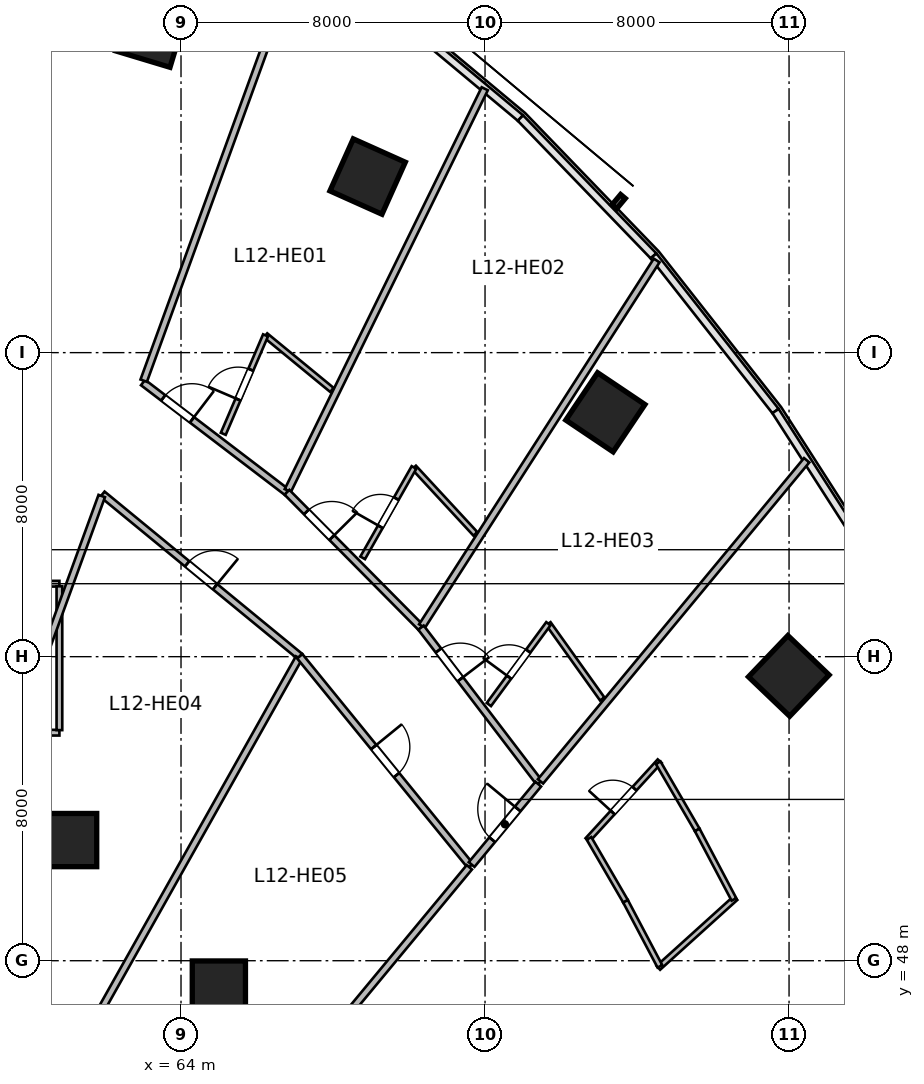
"""IFC4 building model, lengths in metres.
Left out: names, types, materials, properties, quantities, classifications, styles, units other than length and angle.
Written with IfcOpenShell. Run it as: python <this file> out.ifc"""

import sys

from ifc_helpers import new_model, si_unit, direction, frame, frame_2d, origin, origin_2d, place, context, subcontext, project, spatial, rectangle, circle, extrude, source, transform, mapped, element, fill, save


model = new_model("IFC4")
c1 = context("Model", 3, precision=1e-05, world=origin(), true_north=direction((0.0, 1.0)))
c2 = subcontext(c1, "Body", "Model", "MODEL_VIEW")
j1 = project(units=[si_unit("LENGTHUNIT", "METRE"), si_unit("PLANEANGLEUNIT", "RADIAN")], contexts=[c1])
p1 = place(None, origin())
s1 = spatial("IfcSite", under=j1, at=p1, CompositionType="ELEMENT")
p2 = place(p1, origin())
s2 = spatial("IfcBuilding", under=s1, at=p2, CompositionType="ELEMENT")
p3 = place(p2, frame((0.0, 0.0, 57.0)))
s3 = spatial("IfcBuildingStorey", under=s2, at=p3, CompositionType="ELEMENT", Elevation=57.0)
m1 = source(origin(), c2, "Body", "SweptSolid", [
    extrude(rectangle(XDim=1.5, YDim=1.5, at=origin_2d()), origin(), (0.0, 0.0, 1.0), 3.6),
])
p4 = place(p3, frame((63.209, 72.442, 0.0), z_axis=(0.0, 0.0, 1.0), x_axis=(0.288697611798, 0.957420330337, 0.0)))
e1 = element("IfcColumn", 1, at=p4, inside=s3, PredefinedType="COLUMN", context=c2, shape_type="MappedRepresentation", body=[
    mapped(m1, transform((0.0, 0.0, 0.0), scale=1.0)),
])
m2 = source(origin(), c2, "Body", "SweptSolid", [
    extrude(circle(Radius=0.7, at=origin_2d()), origin(), (0.0, 0.0, 1.0), 3.6),
])
p5 = place(p3, frame((61.082, 51.175, 0.0), z_axis=(0.0, 0.0, 1.0), x_axis=(0.409126902895, 0.912477494148, 0.0)))
e2 = element("IfcColumn", 2, at=p5, inside=s3, PredefinedType="COLUMN", context=c2, shape_type="MappedRepresentation", body=[
    mapped(m2, transform((0.0, 0.0, 0.0), scale=1.0)),
])
p6 = place(p3, frame((68.91, 68.633, 0.0), z_axis=(0.0, 0.0, 1.0), x_axis=(0.409126902895, 0.912477494148, 0.0)))
e3 = element("IfcColumn", 3, at=p6, inside=s3, PredefinedType="COLUMN", context=c2, shape_type="MappedRepresentation", body=[
    mapped(m1, transform((0.0, 0.0, 0.0), scale=1.0)),
])
p7 = place(p3, frame((64.996, 47.294, 0.0), z_axis=(0.0, 0.0, 1.0), x_axis=(0.55774510898, 0.830012285095, 0.0)))
e4 = element("IfcColumn", 4, at=p7, inside=s3, PredefinedType="COLUMN", context=c2, shape_type="MappedRepresentation", body=[
    mapped(m2, transform((0.0, 0.0, 0.0), scale=1.0)),
])
for number, where, z_axis, x_axis in (
    (5, (75.167, 62.43, 0.0), (0.0, 0.0, 1.0), (0.558, 0.83, 0.0)),
    (6, (79.993, 55.494, 0.0), (0.0, 0.0, 1.0), (0.691, 0.723, 0.0)),
):
    element("IfcColumn", number, at=place(p3, frame(where, z_axis=z_axis, x_axis=x_axis)), inside=s3, PredefinedType="COLUMN", context=c2, shape_type="MappedRepresentation", body=[
        mapped(m1, transform((0.0, 0.0, 0.0), scale=1.0)),
    ])
m3 = source(origin(), c2, "Body", "SweptSolid", [
    extrude(rectangle(XDim=6.6, YDim=0.15, at=frame_2d((3.3, 0.0))), origin(), (0.0, 0.0, 1.0), 2.803),
])
p8 = place(p3, frame((54.2, 54.0, 0.0), z_axis=(0.0, 0.0, 1.0), x_axis=(1.0, 0.0, 0.0)))
e7 = element("IfcWall", 7, at=p8, inside=s3, PredefinedType="PARTITIONING", context=c2, shape_type="MappedRepresentation", body=[
    mapped(m3, transform((0.0, 0.0, 0.0), scale=1.0)),
])
m4 = source(origin(), c2, "Body", "SweptSolid", [
    extrude(rectangle(XDim=6.6, YDim=0.15, at=frame_2d((3.3, 0.0))), origin(), (0.0, 0.0, 1.0), 3.36),
])
p9 = place(p3, frame((54.2, 57.92, 0.0), z_axis=(0.0, 0.0, 1.0), x_axis=(1.0, 0.0, 0.0)))
e8 = element("IfcWall", 8, at=p9, inside=s3, PredefinedType="PARTITIONING", context=c2, shape_type="MappedRepresentation", body=[
    mapped(m4, transform((0.0, 0.0, 0.0), scale=1.0)),
])
p10 = place(p9, frame((2.825, 0.0, 0.0)))
e9 = element("IfcOpeningElement", 9, at=p10, cuts=e8, PredefinedType="OPENING", context=c2, shape_type="SweptSolid", body=[
    extrude(rectangle(XDim=0.95, YDim=2.1, at=frame_2d((0.475, 1.05))), frame((0.0, 0.085, 0.0), z_axis=(0.0, -1.0, 0.0), x_axis=(1.0, 0.0, 0.0)), (0.0, 0.0, 1.0), 0.17),
])
m5 = source(origin(), c2, "Body", "SweptSolid", [
    extrude(rectangle(XDim=3.785, YDim=0.15, at=frame_2d((1.893, 0.0))), origin(), (0.0, 0.0, 1.0), 3.36),
])
p11 = place(p3, frame((60.8, 54.067, 0.0), z_axis=(0.0, 0.0, 1.0), x_axis=(0.0, 1.0, 0.0)))
e10 = element("IfcWall", 10, at=p11, inside=s3, PredefinedType="PARTITIONING", context=c2, shape_type="MappedRepresentation", body=[
    mapped(m5, transform((0.0, 0.0, 0.0), scale=1.0)),
])
m6 = source(origin(), c2, "Body", "SweptSolid", [
    extrude(rectangle(XDim=4.762, YDim=0.18, at=frame_2d((2.381, 0.0))), origin(), (0.0, 0.0, 1.0), 3.36),
])
p12 = place(p3, frame((63.001, 63.214, 0.0), z_axis=(0.0, 0.0, 1.0), x_axis=(0.795070295872, -0.60651729128, 0.0)))
e11 = element("IfcWall", 11, at=p12, inside=s3, PredefinedType="PLUMBINGWALL", context=c2, shape_type="MappedRepresentation", body=[
    mapped(m6, transform((0.0, 0.0, 0.0), scale=1.0)),
])
p13 = place(p12, frame((0.668, 0.0, 0.0)))
e12 = element("IfcOpeningElement", 12, at=p13, cuts=e11, PredefinedType="OPENING", context=c2, shape_type="SweptSolid", body=[
    extrude(rectangle(XDim=0.95, YDim=2.15, at=frame_2d((0.475, 1.075))), frame((0.0, 0.1, 0.0), z_axis=(0.0, -1.0, 0.0), x_axis=(1.0, 0.0, 0.0)), (0.0, 0.0, 1.0), 0.2),
])
m7 = source(origin(), c2, "Body", "SweptSolid", [
    extrude(rectangle(XDim=12.088, YDim=0.18, at=frame_2d((6.044, 0.0))), origin(), (0.0, 0.0, 1.0), 3.36),
])
p14 = place(p3, frame((63.019, 63.262, 0.0), z_axis=(0.0, 0.0, 1.0), x_axis=(0.34203007529, 0.939689005787, 0.0)))
e13 = element("IfcWall", 13, at=p14, inside=s3, PredefinedType="PLUMBINGWALL", context=c2, shape_type="MappedRepresentation", body=[
    mapped(m7, transform((0.0, 0.0, 0.0), scale=1.0)),
])
m8 = source(origin(), c2, "Body", "SweptSolid", [
    extrude(rectangle(XDim=11.775, YDim=0.18, at=frame_2d((5.887, 0.0))), origin(), (0.0, 0.0, 1.0), 3.36),
])
p15 = place(p3, frame((66.81, 60.371, 0.0), z_axis=(0.0, 0.0, 1.0), x_axis=(0.4401500056, 0.897924257702, 0.0)))
e14 = element("IfcWall", 14, at=p15, inside=s3, PredefinedType="PLUMBINGWALL", context=c2, shape_type="MappedRepresentation", body=[
    mapped(m8, transform((0.0, 0.0, 0.0), scale=1.0)),
])
m9 = source(origin(), c2, "Body", "SweptSolid", [
    extrude(rectangle(XDim=2.26, YDim=0.14, at=frame_2d((1.13, 0.0))), origin(), (0.0, 0.0, 1.0), 3.36),
])
p16 = place(p3, frame((66.224, 64.455, 0.0), z_axis=(0.0, 0.0, 1.0), x_axis=(0.772646789219, -0.634836151388, 0.0)))
e15 = element("IfcWall", 15, at=p16, inside=s3, PredefinedType="PARTITIONING", context=c2, shape_type="MappedRepresentation", body=[
    mapped(m9, transform((0.0, 0.0, 0.0), scale=1.0)),
])
m10 = source(origin(), c2, "Body", "SweptSolid", [
    extrude(rectangle(XDim=2.819, YDim=0.14, at=frame_2d((1.409, 0.0))), origin(), (0.0, 0.0, 1.0), 3.36),
])
p17 = place(p3, frame((65.112, 61.864, 0.0), z_axis=(0.0, 0.0, 1.0), x_axis=(0.394420979357, 0.918929861874, 0.0)))
e16 = element("IfcWall", 16, at=p17, inside=s3, PredefinedType="PARTITIONING", context=c2, shape_type="MappedRepresentation", body=[
    mapped(m10, transform((0.0, 0.0, 0.0), scale=1.0)),
])
p18 = place(p17, frame((0.984, 0.0, 0.0)))
e17 = element("IfcOpeningElement", 17, at=p18, cuts=e16, PredefinedType="OPENING", context=c2, shape_type="SweptSolid", body=[
    extrude(rectangle(XDim=0.85, YDim=2.05, at=frame_2d((0.425, 1.025))), frame((0.0, 0.08, 0.0), z_axis=(0.0, -1.0, 0.0), x_axis=(1.0, 0.0, 0.0)), (0.0, 0.0, 1.0), 0.16),
])
m11 = source(origin(), c2, "Body", "SweptSolid", [
    extrude(rectangle(XDim=5.012, YDim=0.18, at=frame_2d((2.506, 0.0))), origin(), (0.0, 0.0, 1.0), 3.36),
])
p19 = place(p3, frame((66.788, 60.326, 0.0), z_axis=(0.0, 0.0, 1.0), x_axis=(0.703664626435, -0.710532260707, 0.0)))
e18 = element("IfcWall", 18, at=p19, inside=s3, PredefinedType="PLUMBINGWALL", context=c2, shape_type="MappedRepresentation", body=[
    mapped(m11, transform((0.0, 0.0, 0.0), scale=1.0)),
])
p20 = place(p19, frame((0.728, 0.0, 0.0)))
e19 = element("IfcOpeningElement", 19, at=p20, cuts=e18, PredefinedType="OPENING", context=c2, shape_type="SweptSolid", body=[
    extrude(rectangle(XDim=0.95, YDim=2.15, at=frame_2d((0.475, 1.075))), frame((0.0, 0.1, 0.0), z_axis=(0.0, -1.0, 0.0), x_axis=(1.0, 0.0, 0.0)), (0.0, 0.0, 1.0), 0.2),
])
m12 = source(origin(), c2, "Body", "SweptSolid", [
    extrude(rectangle(XDim=11.432, YDim=0.18, at=frame_2d((5.716, 0.0))), origin(), (0.0, 0.0, 1.0), 3.36),
])
p21 = place(p3, frame((70.341, 56.805, 0.0), z_axis=(0.0, 0.0, 1.0), x_axis=(0.540196183124, 0.841539115988, 0.0)))
e20 = element("IfcWall", 20, at=p21, inside=s3, PredefinedType="PLUMBINGWALL", context=c2, shape_type="MappedRepresentation", body=[
    mapped(m12, transform((0.0, 0.0, 0.0), scale=1.0)),
])
m13 = source(origin(), c2, "Body", "SweptSolid", [
    extrude(rectangle(XDim=2.38, YDim=0.14, at=frame_2d((1.19, 0.0))), origin(), (0.0, 0.0, 1.0), 3.36),
])
p22 = place(p3, frame((70.131, 60.979, 0.0), z_axis=(0.0, 0.0, 1.0), x_axis=(0.679084816758, -0.734059814762, 0.0)))
e21 = element("IfcWall", 21, at=p22, inside=s3, PredefinedType="PARTITIONING", context=c2, shape_type="MappedRepresentation", body=[
    mapped(m13, transform((0.0, 0.0, 0.0), scale=1.0)),
])
m14 = source(origin(), c2, "Body", "SweptSolid", [
    extrude(rectangle(XDim=2.735, YDim=0.14, at=frame_2d((1.367, 0.0))), origin(), (0.0, 0.0, 1.0), 3.36),
])
p23 = place(p3, frame((68.781, 58.6, 0.0), z_axis=(0.0, 0.0, 1.0), x_axis=(0.493694940578, 0.869635156631, 0.0)))
e22 = element("IfcWall", 22, at=p23, inside=s3, PredefinedType="PARTITIONING", context=c2, shape_type="MappedRepresentation", body=[
    mapped(m14, transform((0.0, 0.0, 0.0), scale=1.0)),
])
p24 = place(p23, frame((0.942, 0.0, 0.0)))
e23 = element("IfcOpeningElement", 23, at=p24, cuts=e22, PredefinedType="OPENING", context=c2, shape_type="SweptSolid", body=[
    extrude(rectangle(XDim=0.85, YDim=2.05, at=frame_2d((0.425, 1.025))), frame((0.0, 0.08, 0.0), z_axis=(0.0, -1.0, 0.0), x_axis=(1.0, 0.0, 0.0)), (0.0, 0.0, 1.0), 0.16),
])
m15 = source(origin(), c2, "Body", "SweptSolid", [
    extrude(rectangle(XDim=5.135, YDim=0.18, at=frame_2d((2.567, 0.0))), origin(), (0.0, 0.0, 1.0), 3.36),
])
p25 = place(p3, frame((70.315, 56.764, 0.0), z_axis=(0.0, 0.0, 1.0), x_axis=(0.606802199649, -0.794852873494, 0.0)))
e24 = element("IfcWall", 24, at=p25, inside=s3, PredefinedType="PLUMBINGWALL", context=c2, shape_type="MappedRepresentation", body=[
    mapped(m15, transform((0.0, 0.0, 0.0), scale=1.0)),
])
p26 = place(p25, frame((0.757, 0.0, 0.0)))
e25 = element("IfcOpeningElement", 25, at=p26, cuts=e24, PredefinedType="OPENING", context=c2, shape_type="SweptSolid", body=[
    extrude(rectangle(XDim=0.95, YDim=2.15, at=frame_2d((0.475, 1.075))), frame((0.0, 0.1, 0.0), z_axis=(0.0, -1.0, 0.0), x_axis=(1.0, 0.0, 0.0)), (0.0, 0.0, 1.0), 0.2),
])
m16 = source(origin(), c2, "Body", "SweptSolid", [
    extrude(rectangle(XDim=10.975, YDim=0.18, at=frame_2d((5.487, 0.0))), origin(), (0.0, 0.0, 1.0), 3.36),
])
p27 = place(p3, frame((73.46, 52.719, 0.0), z_axis=(0.0, 0.0, 1.0), x_axis=(0.638125265812, 0.769932558821, 0.0)))
e26 = element("IfcWall", 26, at=p27, inside=s3, PredefinedType="PLUMBINGWALL", context=c2, shape_type="MappedRepresentation", body=[
    mapped(m16, transform((0.0, 0.0, 0.0), scale=1.0)),
])
m17 = source(origin(), c2, "Body", "SweptSolid", [
    extrude(rectangle(XDim=2.437, YDim=0.14, at=frame_2d((1.218, 0.0))), origin(), (0.0, 0.0, 1.0), 3.36),
])
p28 = place(p3, frame((73.667, 56.868, 0.0), z_axis=(0.0, 0.0, 1.0), x_axis=(0.581797219134, -0.813333877204, 0.0)))
e27 = element("IfcWall", 27, at=p28, inside=s3, PredefinedType="PARTITIONING", context=c2, shape_type="MappedRepresentation", body=[
    mapped(m17, transform((0.0, 0.0, 0.0), scale=1.0)),
])
m18 = source(origin(), c2, "Body", "SweptSolid", [
    extrude(rectangle(XDim=2.642, YDim=0.14, at=frame_2d((1.321, 0.0))), origin(), (0.0, 0.0, 1.0), 3.36),
])
p29 = place(p3, frame((72.101, 54.741, 0.0), z_axis=(0.0, 0.0, 1.0), x_axis=(0.592789122423, 0.805357719487, 0.0)))
e28 = element("IfcWall", 28, at=p29, inside=s3, PredefinedType="PARTITIONING", context=c2, shape_type="MappedRepresentation", body=[
    mapped(m18, transform((0.0, 0.0, 0.0), scale=1.0)),
])
p30 = place(p29, frame((0.896, 0.0, 0.0)))
e29 = element("IfcOpeningElement", 29, at=p30, cuts=e28, PredefinedType="OPENING", context=c2, shape_type="SweptSolid", body=[
    extrude(rectangle(XDim=0.85, YDim=2.05, at=frame_2d((0.425, 1.025))), frame((0.0, 0.08, 0.0), z_axis=(0.0, -1.0, 0.0), x_axis=(1.0, 0.0, 0.0)), (0.0, 0.0, 1.0), 0.16),
])
m19 = source(origin(), c2, "Body", "SweptSolid", [
    extrude(rectangle(XDim=6.721, YDim=0.18, at=frame_2d((3.361, 0.0))), origin(), (0.0, 0.0, 1.0), 3.36),
])
p31 = place(p3, frame((61.931, 60.275, 0.0), z_axis=(0.0, 0.0, 1.0), x_axis=(0.772828051199, -0.63461547671, 0.0)))
e30 = element("IfcWall", 30, at=p31, inside=s3, PredefinedType="PLUMBINGWALL", context=c2, shape_type="MappedRepresentation", body=[
    mapped(m19, transform((0.0, 0.0, 0.0), scale=1.0)),
])
p32 = place(p31, frame((2.885, 0.0, 0.0)))
e31 = element("IfcOpeningElement", 31, at=p32, cuts=e30, PredefinedType="OPENING", context=c2, shape_type="SweptSolid", body=[
    extrude(rectangle(XDim=0.95, YDim=2.15, at=frame_2d((0.475, 1.075))), frame((0.0, 0.1, 0.0), z_axis=(0.0, -1.0, 0.0), x_axis=(1.0, 0.0, 0.0)), (0.0, 0.0, 1.0), 0.2),
])
m20 = source(origin(), c2, "Body", "SweptSolid", [
    extrude(rectangle(XDim=12.196, YDim=0.18, at=frame_2d((6.098, 0.0))), origin(), (0.0, 0.0, 1.0), 3.36),
])
p33 = place(p3, frame((57.742, 48.766, 0.0), z_axis=(0.0, 0.0, 1.0), x_axis=(0.342022711534, 0.939691686031, 0.0)))
e32 = element("IfcWall", 32, at=p33, inside=s3, PredefinedType="PLUMBINGWALL", context=c2, shape_type="MappedRepresentation", body=[
    mapped(m20, transform((0.0, 0.0, 0.0), scale=1.0)),
])
m21 = source(origin(), c2, "Body", "SweptSolid", [
    extrude(rectangle(XDim=11.67, YDim=0.18, at=frame_2d((5.835, 0.0))), origin(), (0.0, 0.0, 1.0), 3.36),
])
p34 = place(p3, frame((61.381, 45.795, 0.0), z_axis=(0.0, 0.0, 1.0), x_axis=(0.490156946222, 0.871634193954, 0.0)))
e33 = element("IfcWall", 33, at=p34, inside=s3, PredefinedType="PLUMBINGWALL", context=c2, shape_type="MappedRepresentation", body=[
    mapped(m21, transform((0.0, 0.0, 0.0), scale=1.0)),
])
m22 = source(origin(), c2, "Body", "SweptSolid", [
    extrude(rectangle(XDim=7.113, YDim=0.18, at=frame_2d((3.556, 0.0))), origin(), (0.0, 0.0, 1.0), 3.36),
])
p35 = place(p3, frame((67.126, 56.01, 0.0), z_axis=(0.0, 0.0, 1.0), x_axis=(0.63149032532, -0.775383755974, 0.0)))
e34 = element("IfcWall", 34, at=p35, inside=s3, PredefinedType="PLUMBINGWALL", context=c2, shape_type="MappedRepresentation", body=[
    mapped(m22, transform((0.0, 0.0, 0.0), scale=1.0)),
])
p36 = place(p35, frame((3.081, 0.0, 0.0)))
e35 = element("IfcOpeningElement", 35, at=p36, cuts=e34, PredefinedType="OPENING", context=c2, shape_type="SweptSolid", body=[
    extrude(rectangle(XDim=0.95, YDim=2.15, at=frame_2d((0.475, 1.075))), frame((0.0, 0.1, 0.0), z_axis=(0.0, -1.0, 0.0), x_axis=(1.0, 0.0, 0.0)), (0.0, 0.0, 1.0), 0.2),
])
m23 = source(origin(), c2, "Body", "SweptSolid", [
    extrude(rectangle(XDim=11.053, YDim=0.18, at=frame_2d((5.527, 0.0))), origin(), (0.0, 0.0, 1.0), 3.36),
])
p37 = place(p3, frame((64.534, 41.949, 0.0), z_axis=(0.0, 0.0, 1.0), x_axis=(0.638131235571, 0.769927611005, 0.0)))
e36 = element("IfcWall", 36, at=p37, inside=s3, PredefinedType="PLUMBINGWALL", context=c2, shape_type="MappedRepresentation", body=[
    mapped(m23, transform((0.0, 0.0, 0.0), scale=1.0)),
])
m24 = source(origin(), c2, "Body", "SweptSolid", [
    extrude(rectangle(XDim=2.748, YDim=0.195, at=frame_2d((1.374, 0.0))), origin(), (0.0, 0.0, 1.0), 3.36),
])
p38 = place(p3, frame((71.647, 50.531, 0.0), z_axis=(0.0, 0.0, 1.0), x_axis=(0.638111168284, 0.769944242729, 0.0)))
e37 = element("IfcWall", 37, at=p38, inside=s3, PredefinedType="PARTITIONING", context=c2, shape_type="MappedRepresentation", body=[
    mapped(m24, transform((0.0, 0.0, 0.0), scale=1.0)),
])
p39 = place(p38, frame((0.849, 0.0, 0.0)))
e38 = element("IfcOpeningElement", 38, at=p39, cuts=e37, PredefinedType="OPENING", context=c2, shape_type="SweptSolid", body=[
    extrude(rectangle(XDim=1.05, YDim=2.15, at=frame_2d((0.525, 1.075))), frame((0.0, 0.107, 0.0), z_axis=(0.0, -1.0, 0.0), x_axis=(1.0, 0.0, 0.0)), (0.0, 0.0, 1.0), 0.215),
])
m25 = source(origin(), c2, "Body", "SweptSolid", [
    extrude(rectangle(XDim=2.812, YDim=0.14, at=frame_2d((1.406, 0.0))), origin(), (0.0, 0.0, 1.0), 3.36),
])
p40 = place(p3, frame((74.697, 51.177, 0.0), z_axis=(0.0, 0.0, 1.0), x_axis=(0.675119025852, 0.737708818527, 0.0)))
e39 = element("IfcWall", 39, at=p40, inside=s3, PredefinedType="PARTITIONING", context=c2, shape_type="MappedRepresentation", body=[
    mapped(m25, transform((0.0, 0.0, 0.0), scale=1.0)),
])
p41 = place(p40, frame((0.981, 0.0, 0.0)))
e40 = element("IfcOpeningElement", 40, at=p41, cuts=e39, PredefinedType="OPENING", context=c2, shape_type="SweptSolid", body=[
    extrude(rectangle(XDim=0.85, YDim=2.05, at=frame_2d((0.425, 1.025))), frame((0.0, 0.08, 0.0), z_axis=(0.0, -1.0, 0.0), x_axis=(1.0, 0.0, 0.0)), (0.0, 0.0, 1.0), 0.16),
])
m26 = source(origin(), c2, "Body", "SweptSolid", [
    extrude(rectangle(XDim=2.738, YDim=0.14, at=frame_2d((1.369, 0.0))), origin(), (0.0, 0.0, 1.0), 3.36),
])
p42 = place(p3, frame((76.56, 47.814, 0.0), z_axis=(0.0, 0.0, 1.0), x_axis=(0.741873676582, 0.670539669218, 0.0)))
e41 = element("IfcWall", 41, at=p42, inside=s3, PredefinedType="PARTITIONING", context=c2, shape_type="MappedRepresentation", body=[
    mapped(m26, transform((0.0, 0.0, 0.0), scale=1.0)),
])
m27 = source(origin(), c2, "Body", "SweptSolid", [
    extrude(rectangle(XDim=1.914, YDim=0.14, at=frame_2d((0.957, 0.0))), origin(), (0.0, 0.0, 1.0), 3.36),
])
p43 = place(p3, frame((74.736, 51.219, 0.0), z_axis=(0.0, 0.0, 1.0), x_axis=(0.502347790612, -0.864665656347, 0.0)))
e42 = element("IfcWall", 42, at=p43, inside=s3, PredefinedType="PARTITIONING", context=c2, shape_type="MappedRepresentation", body=[
    mapped(m27, transform((0.0, 0.0, 0.0), scale=1.0)),
])
m28 = source(origin(), c2, "Body", "SweptSolid", [
    extrude(rectangle(XDim=2.045, YDim=0.14, at=frame_2d((1.022, 0.0))), origin(), (0.0, 0.0, 1.0), 3.36),
])
p44 = place(p3, frame((76.557, 53.209, 0.0), z_axis=(0.0, 0.0, 1.0), x_axis=(0.5023112139, -0.864686905411, 0.0)))
e43 = element("IfcWall", 43, at=p44, inside=s3, PredefinedType="PARTITIONING", context=c2, shape_type="MappedRepresentation", body=[
    mapped(m28, transform((0.0, 0.0, 0.0), scale=1.0)),
])
m29 = source(origin(), c2, "Body", "SweptSolid", [
    extrude(rectangle(XDim=1.936, YDim=0.14, at=frame_2d((0.968, 0.0))), origin(), (0.0, 0.0, 1.0), 3.36),
])
p45 = place(p3, frame((75.697, 49.563, 0.0), z_axis=(0.0, 0.0, 1.0), x_axis=(0.467174971862, -0.884164886017, 0.0)))
e44 = element("IfcWall", 44, at=p45, inside=s3, PredefinedType="PARTITIONING", context=c2, shape_type="MappedRepresentation", body=[
    mapped(m29, transform((0.0, 0.0, 0.0), scale=1.0)),
])
m30 = source(origin(), c2, "Body", "SweptSolid", [
    extrude(rectangle(XDim=2.068, YDim=0.14, at=frame_2d((1.034, 0.0))), origin(), (0.0, 0.0, 1.0), 3.36),
])
p46 = place(p3, frame((77.584, 51.441, 0.0), z_axis=(0.0, 0.0, 1.0), x_axis=(0.467215057643, -0.884143704333, 0.0)))
e45 = element("IfcWall", 45, at=p46, inside=s3, PredefinedType="PARTITIONING", context=c2, shape_type="MappedRepresentation", body=[
    mapped(m30, transform((0.0, 0.0, 0.0), scale=1.0)),
])
m31 = source(origin(), c2, "Body", "SweptSolid", [
    extrude(rectangle(XDim=0.95, YDim=2.15, at=frame_2d((0.475, 1.075))), frame((0.0, 0.025, 0.0), z_axis=(0.0, -1.0, 0.0), x_axis=(1.0, 0.0, 0.0)), (0.0, 0.0, 1.0), 0.05),
])
p47 = place(p13, origin())
e46 = element("IfcDoor", 46, at=p47, inside=s3, OperationType="SINGLE_SWING_RIGHT", PredefinedType="DOOR", context=c2, shape_type="MappedRepresentation", body=[
    mapped(m31, transform((0.0, 0.0, 0.0), scale=1.0)),
])
fill(e12, e46)
m32 = source(origin(), c2, "Body", "SweptSolid", [
    extrude(rectangle(XDim=0.85, YDim=2.05, at=frame_2d((0.425, 1.025))), frame((0.0, 0.025, 0.0), z_axis=(0.0, -1.0, 0.0), x_axis=(1.0, 0.0, 0.0)), (0.0, 0.0, 1.0), 0.05),
])
p48 = place(p18, origin())
e47 = element("IfcDoor", 47, at=p48, inside=s3, OperationType="SINGLE_SWING_LEFT", PredefinedType="DOOR", context=c2, shape_type="MappedRepresentation", body=[
    mapped(m32, transform((0.0, 0.0, 0.0), scale=1.0)),
])
fill(e17, e47)
p49 = place(p20, origin())
e48 = element("IfcDoor", 48, at=p49, inside=s3, OperationType="SINGLE_SWING_RIGHT", PredefinedType="DOOR", context=c2, shape_type="MappedRepresentation", body=[
    mapped(m31, transform((0.0, 0.0, 0.0), scale=1.0)),
])
fill(e19, e48)
p50 = place(p24, origin())
e49 = element("IfcDoor", 49, at=p50, inside=s3, OperationType="SINGLE_SWING_LEFT", PredefinedType="DOOR", context=c2, shape_type="MappedRepresentation", body=[
    mapped(m32, transform((0.0, 0.0, 0.0), scale=1.0)),
])
fill(e23, e49)
p51 = place(p26, origin())
e50 = element("IfcDoor", 50, at=p51, inside=s3, OperationType="SINGLE_SWING_RIGHT", PredefinedType="DOOR", context=c2, shape_type="MappedRepresentation", body=[
    mapped(m31, transform((0.0, 0.0, 0.0), scale=1.0)),
])
fill(e25, e50)
p52 = place(p30, origin())
e51 = element("IfcDoor", 51, at=p52, inside=s3, OperationType="SINGLE_SWING_LEFT", PredefinedType="DOOR", context=c2, shape_type="MappedRepresentation", body=[
    mapped(m32, transform((0.0, 0.0, 0.0), scale=1.0)),
])
fill(e29, e51)
p53 = place(p32, origin())
e52 = element("IfcDoor", 52, at=p53, inside=s3, OperationType="SINGLE_SWING_RIGHT", PredefinedType="DOOR", context=c2, shape_type="MappedRepresentation", body=[
    mapped(m31, transform((0.0, 0.0, 0.0), scale=1.0)),
])
fill(e31, e52)
p54 = place(p36, origin())
e53 = element("IfcDoor", 53, at=p54, inside=s3, OperationType="SINGLE_SWING_LEFT", PredefinedType="DOOR", context=c2, shape_type="MappedRepresentation", body=[
    mapped(m31, transform((0.0, 0.0, 0.0), scale=1.0)),
])
fill(e35, e53)
m33 = source(origin(), c2, "Body", "SweptSolid", [
    extrude(rectangle(XDim=1.05, YDim=2.15, at=frame_2d((0.525, 1.075))), frame((0.0, 0.025, 0.0), z_axis=(0.0, -1.0, 0.0), x_axis=(1.0, 0.0, 0.0)), (0.0, 0.0, 1.0), 0.05),
])
p55 = place(p39, origin())
e54 = element("IfcDoor", 54, at=p55, inside=s3, OperationType="SINGLE_SWING_RIGHT", PredefinedType="DOOR", context=c2, shape_type="MappedRepresentation", body=[
    mapped(m33, transform((0.0, 0.0, 0.0), scale=1.0)),
])
fill(e38, e54)
p56 = place(p41, origin())
e55 = element("IfcDoor", 55, at=p56, inside=s3, OperationType="SINGLE_SWING_LEFT", PredefinedType="DOOR", context=c2, shape_type="MappedRepresentation", body=[
    mapped(m32, transform((0.0, 0.0, 0.0), scale=1.0)),
])
fill(e40, e55)
save(model, sys.argv[1])
